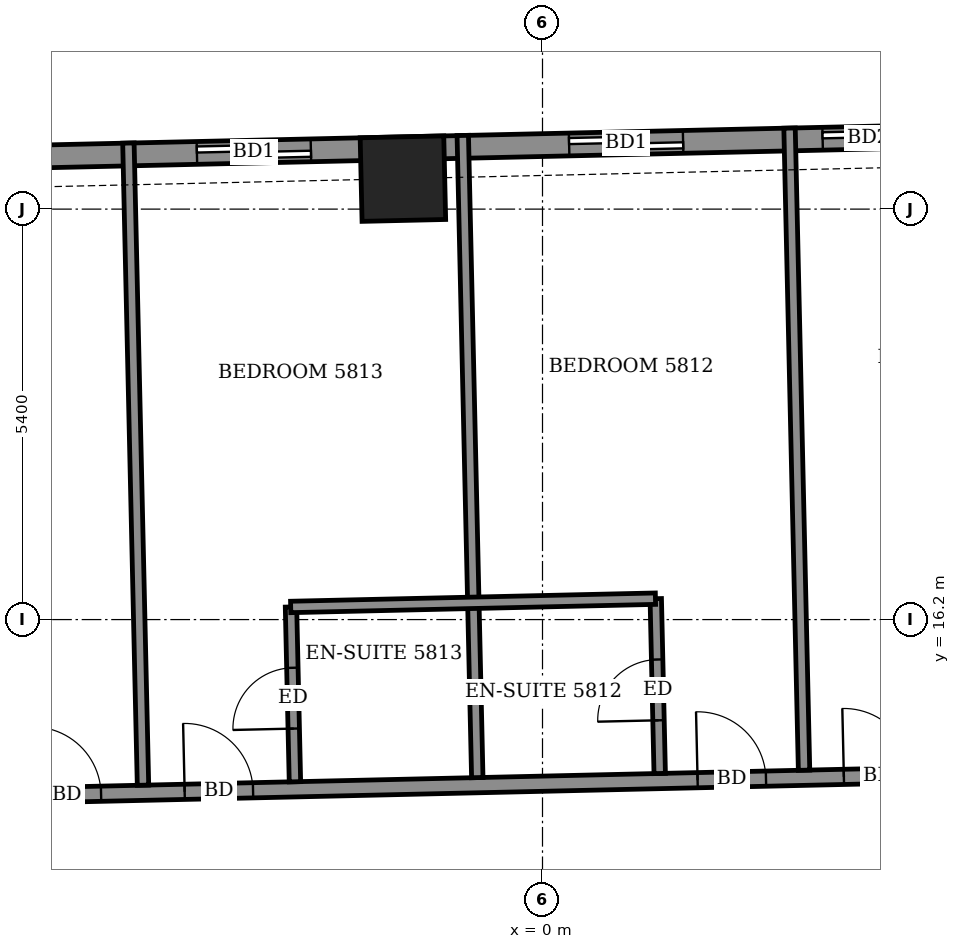
"""IFC4 building model, lengths in metres.
Left out: names, types, materials, properties, quantities, classifications, styles, units other than length and angle.
Written with IfcOpenShell. Run it as: python <this file> out.ifc"""

import sys

from ifc_helpers import new_model, si_unit, direction, frame, frame_2d, origin, origin_2d, place, context, subcontext, project, spatial, rectangle, extrude, element, fill, save


model = new_model("IFC4")
c1 = context("Model", 3, precision=1e-05, world=origin(), true_north=direction((0.0, 1.0)))
c2 = subcontext(c1, "Body", "Model", "MODEL_VIEW")
j1 = project(units=[si_unit("LENGTHUNIT", "METRE"), si_unit("PLANEANGLEUNIT", "RADIAN")], contexts=[c1])
p1 = place(None, origin())
s1 = spatial("IfcSite", under=j1, at=p1, CompositionType="ELEMENT")
p2 = place(p1, origin())
s2 = spatial("IfcBuilding", under=s1, at=p2, CompositionType="ELEMENT")
p3 = place(p2, frame((0.0, 0.0, 231.1)))
s3 = spatial("IfcBuildingStorey", under=s2, at=p3, CompositionType="ELEMENT", Elevation=231.1)
p4 = place(p3, frame((-1.836, 22.001, -0.55), z_axis=(0.0, 0.0, 1.0), x_axis=(-0.999742388325, -0.022697070002, 0.0)))
e1 = element("IfcColumn", 1, at=p4, inside=s3, PredefinedType="COLUMN", context=c2, shape_type="SweptSolid", body=[
    extrude(rectangle(XDim=1.1, YDim=1.1, at=origin_2d()), origin(), (0.0, 0.0, 1.0), 3.6),
])
p5 = place(p3, frame((20.403, 22.905, 0.0), z_axis=(0.0, 0.0, 1.0), x_axis=(-0.99974298964, -0.022670568288, 0.0)))
e2 = element("IfcWall", 2, at=p5, inside=s3, PredefinedType="SOLIDWALL", context=c2, shape_type="SweptSolid", body=[
    extrude(rectangle(XDim=44.509, YDim=0.3, at=frame_2d((22.254, 0.0))), origin(), (0.0, 0.0, 1.0), 2.55),
])
p6 = place(p5, frame((1.62, 0.0, 0.0)))
e3 = element("IfcOpeningElement", 3, at=p6, cuts=e2, PredefinedType="OPENING", context=c2, shape_type="SweptSolid", body=[
    extrude(rectangle(XDim=1.5, YDim=2.4, at=frame_2d((0.75, 1.2))), frame((0.0, 0.16, 0.0), z_axis=(0.0, -1.0, 0.0), x_axis=(1.0, 0.0, 0.0)), (0.0, 0.0, 1.0), 0.32),
])
p7 = place(p5, frame((4.813, 0.0, 0.0)))
e4 = element("IfcOpeningElement", 4, at=p7, cuts=e2, PredefinedType="OPENING", context=c2, shape_type="SweptSolid", body=[
    extrude(rectangle(XDim=1.5, YDim=2.4, at=frame_2d((0.75, 1.2))), frame((0.0, 0.16, 0.0), z_axis=(0.0, -1.0, 0.0), x_axis=(1.0, 0.0, 0.0)), (0.0, 0.0, 1.0), 0.32),
])
p8 = place(p5, frame((9.833, 0.0, 0.0)))
e5 = element("IfcOpeningElement", 5, at=p8, cuts=e2, PredefinedType="OPENING", context=c2, shape_type="SweptSolid", body=[
    extrude(rectangle(XDim=1.5, YDim=2.4, at=frame_2d((0.75, 1.2))), frame((0.0, 0.16, 0.0), z_axis=(0.0, -1.0, 0.0), x_axis=(1.0, 0.0, 0.0)), (0.0, 0.0, 1.0), 0.32),
])
p9 = place(p5, frame((15.522, 0.0, 0.0)))
e6 = element("IfcOpeningElement", 6, at=p9, cuts=e2, PredefinedType="OPENING", context=c2, shape_type="SweptSolid", body=[
    extrude(rectangle(XDim=1.2, YDim=2.4, at=frame_2d((0.6, 1.2))), frame((0.0, 0.16, 0.0), z_axis=(0.0, -1.0, 0.0), x_axis=(1.0, 0.0, 0.0)), (0.0, 0.0, 1.0), 0.32),
])
p10 = place(p5, frame((18.558, 0.0, 0.0)))
e7 = element("IfcOpeningElement", 7, at=p10, cuts=e2, PredefinedType="OPENING", context=c2, shape_type="SweptSolid", body=[
    extrude(rectangle(XDim=1.5, YDim=2.4, at=frame_2d((0.75, 1.2))), frame((0.0, 0.16, 0.0), z_axis=(0.0, -1.0, 0.0), x_axis=(1.0, 0.0, 0.0)), (0.0, 0.0, 1.0), 0.32),
])
p11 = place(p5, frame((23.456, 0.0, 0.0)))
e8 = element("IfcOpeningElement", 8, at=p11, cuts=e2, PredefinedType="OPENING", context=c2, shape_type="SweptSolid", body=[
    extrude(rectangle(XDim=1.5, YDim=2.4, at=frame_2d((0.75, 1.2))), frame((0.0, 0.16, 0.0), z_axis=(0.0, -1.0, 0.0), x_axis=(1.0, 0.0, 0.0)), (0.0, 0.0, 1.0), 0.32),
])
p12 = place(p5, frame((26.89, 0.0, 0.0)))
e9 = element("IfcOpeningElement", 9, at=p12, cuts=e2, PredefinedType="OPENING", context=c2, shape_type="SweptSolid", body=[
    extrude(rectangle(XDim=1.5, YDim=2.4, at=frame_2d((0.75, 1.2))), frame((0.0, 0.16, 0.0), z_axis=(0.0, -1.0, 0.0), x_axis=(1.0, 0.0, 0.0)), (0.0, 0.0, 1.0), 0.32),
])
p13 = place(p5, frame((31.708, 0.0, 0.0)))
e10 = element("IfcOpeningElement", 10, at=p13, cuts=e2, PredefinedType="OPENING", context=c2, shape_type="SweptSolid", body=[
    extrude(rectangle(XDim=1.5, YDim=2.4, at=frame_2d((0.75, 1.2))), frame((0.0, 0.16, 0.0), z_axis=(0.0, -1.0, 0.0), x_axis=(1.0, 0.0, 0.0)), (0.0, 0.0, 1.0), 0.32),
])
p14 = place(p5, frame((35.024, 0.0, 0.0)))
e11 = element("IfcOpeningElement", 11, at=p14, cuts=e2, PredefinedType="OPENING", context=c2, shape_type="SweptSolid", body=[
    extrude(rectangle(XDim=1.5, YDim=2.4, at=frame_2d((0.75, 1.2))), frame((0.0, 0.16, 0.0), z_axis=(0.0, -1.0, 0.0), x_axis=(1.0, 0.0, 0.0)), (0.0, 0.0, 1.0), 0.32),
])
p15 = place(p5, frame((40.173, 0.0, 0.9)))
e12 = element("IfcOpeningElement", 12, at=p15, cuts=e2, PredefinedType="OPENING", context=c2, shape_type="SweptSolid", body=[
    extrude(rectangle(XDim=2.4, YDim=1.5, at=frame_2d((1.2, 0.75))), frame((0.0, 0.16, 0.0), z_axis=(0.0, -1.0, 0.0), x_axis=(1.0, 0.0, 0.0)), (0.0, 0.0, 1.0), 0.32),
])
p16 = place(p3, frame((-27.652, 13.413, 0.0), z_axis=(0.0, 0.0, 1.0), x_axis=(0.999742610679, 0.022687273792, 0.0)))
e13 = element("IfcWall", 13, at=p16, inside=s3, PredefinedType="PARTITIONING", context=c2, shape_type="SweptSolid", body=[
    extrude(rectangle(XDim=50.857, YDim=0.2, at=frame_2d((25.429, 0.0))), origin(), (0.0, 0.0, 1.0), 3.05),
])
p17 = place(p16, frame((49.179, 0.0, 0.0)))
e14 = element("IfcOpeningElement", 14, at=p17, cuts=e13, PredefinedType="OPENING", context=c2, shape_type="SweptSolid", body=[
    extrude(rectangle(XDim=1.0, YDim=2.1, at=frame_2d((0.5, 1.05))), frame((0.0, 0.11, 0.0), z_axis=(0.0, -1.0, 0.0), x_axis=(1.0, 0.0, 0.0)), (0.0, 0.0, 1.0), 0.22),
])
p18 = place(p16, frame((44.9, 0.0, 0.0)))
e15 = element("IfcOpeningElement", 15, at=p18, cuts=e13, PredefinedType="OPENING", context=c2, shape_type="SweptSolid", body=[
    extrude(rectangle(XDim=0.9, YDim=2.1, at=frame_2d((0.45, 1.05))), frame((0.0, 0.11, 0.0), z_axis=(0.0, -1.0, 0.0), x_axis=(1.0, 0.0, 0.0)), (0.0, 0.0, 1.0), 0.22),
])
p19 = place(p16, frame((40.375, 0.0, 0.0)))
e16 = element("IfcOpeningElement", 16, at=p19, cuts=e13, PredefinedType="OPENING", context=c2, shape_type="SweptSolid", body=[
    extrude(rectangle(XDim=0.9, YDim=2.1, at=frame_2d((0.45, 1.05))), frame((0.0, 0.11, 0.0), z_axis=(0.0, -1.0, 0.0), x_axis=(1.0, 0.0, 0.0)), (0.0, 0.0, 1.0), 0.22),
])
p20 = place(p16, frame((38.425, 0.0, 0.0)))
e17 = element("IfcOpeningElement", 17, at=p20, cuts=e13, PredefinedType="OPENING", context=c2, shape_type="SweptSolid", body=[
    extrude(rectangle(XDim=0.9, YDim=2.1, at=frame_2d((0.45, 1.05))), frame((0.0, 0.11, 0.0), z_axis=(0.0, -1.0, 0.0), x_axis=(1.0, 0.0, 0.0)), (0.0, 0.0, 1.0), 0.22),
])
p21 = place(p16, frame((31.625, 0.0, 0.0)))
e18 = element("IfcOpeningElement", 18, at=p21, cuts=e13, PredefinedType="OPENING", context=c2, shape_type="SweptSolid", body=[
    extrude(rectangle(XDim=0.9, YDim=2.1, at=frame_2d((0.45, 1.05))), frame((0.0, 0.11, 0.0), z_axis=(0.0, -1.0, 0.0), x_axis=(1.0, 0.0, 0.0)), (0.0, 0.0, 1.0), 0.22),
])
p22 = place(p16, frame((29.7, 0.0, 0.0)))
e19 = element("IfcOpeningElement", 19, at=p22, cuts=e13, PredefinedType="OPENING", context=c2, shape_type="SweptSolid", body=[
    extrude(rectangle(XDim=0.9, YDim=2.1, at=frame_2d((0.45, 1.05))), frame((0.0, 0.11, 0.0), z_axis=(0.0, -1.0, 0.0), x_axis=(1.0, 0.0, 0.0)), (0.0, 0.0, 1.0), 0.22),
])
p23 = place(p16, frame((22.95, 0.0, 0.0)))
e20 = element("IfcOpeningElement", 20, at=p23, cuts=e13, PredefinedType="OPENING", context=c2, shape_type="SweptSolid", body=[
    extrude(rectangle(XDim=0.9, YDim=2.1, at=frame_2d((0.45, 1.05))), frame((0.0, 0.11, 0.0), z_axis=(0.0, -1.0, 0.0), x_axis=(1.0, 0.0, 0.0)), (0.0, 0.0, 1.0), 0.22),
])
p24 = place(p16, frame((20.95, 0.0, 0.0)))
e21 = element("IfcOpeningElement", 21, at=p24, cuts=e13, PredefinedType="OPENING", context=c2, shape_type="SweptSolid", body=[
    extrude(rectangle(XDim=0.9, YDim=2.1, at=frame_2d((0.45, 1.05))), frame((0.0, 0.11, 0.0), z_axis=(0.0, -1.0, 0.0), x_axis=(1.0, 0.0, 0.0)), (0.0, 0.0, 1.0), 0.22),
])
p25 = place(p16, frame((14.15, 0.0, 0.0)))
e22 = element("IfcOpeningElement", 22, at=p25, cuts=e13, PredefinedType="OPENING", context=c2, shape_type="SweptSolid", body=[
    extrude(rectangle(XDim=0.9, YDim=2.1, at=frame_2d((0.45, 1.05))), frame((0.0, 0.11, 0.0), z_axis=(0.0, -1.0, 0.0), x_axis=(1.0, 0.0, 0.0)), (0.0, 0.0, 1.0), 0.22),
])
p26 = place(p16, frame((12.2, 0.0, 0.0)))
e23 = element("IfcOpeningElement", 23, at=p26, cuts=e13, PredefinedType="OPENING", context=c2, shape_type="SweptSolid", body=[
    extrude(rectangle(XDim=0.9, YDim=2.1, at=frame_2d((0.45, 1.05))), frame((0.0, 0.11, 0.0), z_axis=(0.0, -1.0, 0.0), x_axis=(1.0, 0.0, 0.0)), (0.0, 0.0, 1.0), 0.22),
])
p27 = place(p16, frame((2.05, 0.0, 0.0)))
e24 = element("IfcOpeningElement", 24, at=p27, cuts=e13, PredefinedType="OPENING", context=c2, shape_type="SweptSolid", body=[
    extrude(rectangle(XDim=1.0, YDim=2.1, at=frame_2d((0.5, 1.05))), frame((0.0, 0.11, 0.0), z_axis=(0.0, -1.0, 0.0), x_axis=(1.0, 0.0, 0.0)), (0.0, 0.0, 1.0), 0.22),
])
p28 = place(p16, frame((7.45, 0.0, 0.0)))
e25 = element("IfcOpeningElement", 25, at=p28, cuts=e13, PredefinedType="OPENING", context=c2, shape_type="SweptSolid", body=[
    extrude(rectangle(XDim=0.9, YDim=2.1, at=frame_2d((0.45, 1.05))), frame((0.0, 0.11, 0.0), z_axis=(0.0, -1.0, 0.0), x_axis=(1.0, 0.0, 0.0)), (0.0, 0.0, 1.0), 0.22),
])
p29 = place(p3, frame((-5.256, 14.021, 0.0), z_axis=(0.0, 0.0, 1.0), x_axis=(-0.022708935798, 0.999742118866, 0.0)))
e26 = element("IfcWall", 26, at=p29, inside=s3, PredefinedType="PARTITIONING", context=c2, shape_type="SweptSolid", body=[
    extrude(rectangle(XDim=8.45, YDim=0.15, at=frame_2d((4.225, 0.0))), origin(), (0.0, 0.0, 1.0), 2.5),
])
p30 = place(p3, frame((-3.257, 14.066, 0.0), z_axis=(0.0, 0.0, 1.0), x_axis=(-0.022603288534, 0.999744513037, 0.0)))
e27 = element("IfcWall", 27, at=p30, inside=s3, PredefinedType="PARTITIONING", context=c2, shape_type="SweptSolid", body=[
    extrude(rectangle(XDim=2.301, YDim=0.15, at=frame_2d((1.15, 0.0))), origin(), (0.0, 0.0, 1.0), 3.05),
])
p31 = place(p30, frame((0.7, 0.0, 0.0)))
e28 = element("IfcOpeningElement", 28, at=p31, cuts=e27, PredefinedType="OPENING", context=c2, shape_type="SweptSolid", body=[
    extrude(rectangle(XDim=0.8, YDim=2.1, at=frame_2d((0.4, 1.05))), frame((0.0, 0.085, 0.0), z_axis=(0.0, -1.0, 0.0), x_axis=(1.0, 0.0, 0.0)), (0.0, 0.0, 1.0), 0.17),
])
p32 = place(p3, frame((-0.858, 14.121, 0.0), z_axis=(0.0, 0.0, 1.0), x_axis=(-0.022622304913, 0.999744082913, 0.0)))
e29 = element("IfcWall", 29, at=p32, inside=s3, PredefinedType="PARTITIONING", context=c2, shape_type="SweptSolid", body=[
    extrude(rectangle(XDim=8.45, YDim=0.15, at=frame_2d((4.225, 0.0))), origin(), (0.0, 0.0, 1.0), 2.5),
])
p33 = place(p3, frame((1.542, 14.175, 0.0), z_axis=(0.0, 0.0, 1.0), x_axis=(-0.022603288534, 0.999744513037, 0.0)))
e30 = element("IfcWall", 30, at=p33, inside=s3, PredefinedType="PARTITIONING", context=c2, shape_type="SweptSolid", body=[
    extrude(rectangle(XDim=2.301, YDim=0.15, at=frame_2d((1.15, 0.0))), origin(), (0.0, 0.0, 1.0), 3.05),
])
p34 = place(p33, frame((0.7, 0.0, 0.0)))
e31 = element("IfcOpeningElement", 31, at=p34, cuts=e30, PredefinedType="OPENING", context=c2, shape_type="SweptSolid", body=[
    extrude(rectangle(XDim=0.8, YDim=2.1, at=frame_2d((0.4, 1.05))), frame((0.0, 0.085, 0.0), z_axis=(0.0, -1.0, 0.0), x_axis=(1.0, 0.0, 0.0)), (0.0, 0.0, 1.0), 0.17),
])
p35 = place(p3, frame((3.441, 14.218, 0.0), z_axis=(0.0, 0.0, 1.0), x_axis=(-0.022593427839, 0.999744735929, 0.0)))
e32 = element("IfcWall", 32, at=p35, inside=s3, PredefinedType="PARTITIONING", context=c2, shape_type="SweptSolid", body=[
    extrude(rectangle(XDim=8.45, YDim=0.15, at=frame_2d((4.225, 0.0))), origin(), (0.0, 0.0, 1.0), 2.5),
])
p36 = place(p3, frame((-3.313, 16.366, 0.0), z_axis=(0.0, 0.0, 1.0), x_axis=(0.99974154664, 0.022734113616, 0.0)))
e33 = element("IfcWall", 33, at=p36, inside=s3, PredefinedType="PARTITIONING", context=c2, shape_type="SweptSolid", body=[
    extrude(rectangle(XDim=4.8, YDim=0.15, at=frame_2d((2.4, 0.0))), origin(), (0.0, 0.0, 1.0), 3.05),
])
p37 = place(p9, origin())
e34 = element("IfcDoor", 34, at=p37, inside=s3, OperationType="SLIDING_TO_LEFT", PredefinedType="DOOR", context=c2, shape_type="SweptSolid", body=[
    extrude(rectangle(XDim=1.2, YDim=2.4, at=frame_2d((0.6, 1.2))), frame((0.0, 0.025, 0.0), z_axis=(0.0, -1.0, 0.0), x_axis=(1.0, 0.0, 0.0)), (0.0, 0.0, 1.0), 0.05),
])
fill(e6, e34)
p38 = place(p10, origin())
e35 = element("IfcDoor", 35, at=p38, inside=s3, OperationType="SLIDING_TO_LEFT", PredefinedType="DOOR", context=c2, shape_type="SweptSolid", body=[
    extrude(rectangle(XDim=1.5, YDim=2.4, at=frame_2d((0.75, 1.2))), frame((0.0, 0.025, 0.0), z_axis=(0.0, -1.0, 0.0), x_axis=(1.0, 0.0, 0.0)), (0.0, 0.0, 1.0), 0.05),
])
fill(e7, e35)
p39 = place(p11, origin())
e36 = element("IfcDoor", 36, at=p39, inside=s3, OperationType="SLIDING_TO_LEFT", PredefinedType="DOOR", context=c2, shape_type="SweptSolid", body=[
    extrude(rectangle(XDim=1.5, YDim=2.4, at=frame_2d((0.75, 1.2))), frame((0.0, 0.025, 0.0), z_axis=(0.0, -1.0, 0.0), x_axis=(1.0, 0.0, 0.0)), (0.0, 0.0, 1.0), 0.05),
])
fill(e8, e36)
p40 = place(p21, origin())
e37 = element("IfcDoor", 37, at=p40, inside=s3, OperationType="SINGLE_SWING_LEFT", PredefinedType="DOOR", context=c2, shape_type="SweptSolid", body=[
    extrude(rectangle(XDim=0.9, YDim=2.1, at=frame_2d((0.45, 1.05))), frame((0.0, 0.025, 0.0), z_axis=(0.0, -1.0, 0.0), x_axis=(1.0, 0.0, 0.0)), (0.0, 0.0, 1.0), 0.05),
])
fill(e18, e37)
p41 = place(p22, origin())
e38 = element("IfcDoor", 38, at=p41, inside=s3, OperationType="SINGLE_SWING_RIGHT", PredefinedType="DOOR", context=c2, shape_type="SweptSolid", body=[
    extrude(rectangle(XDim=0.9, YDim=2.1, at=frame_2d((0.45, 1.05))), frame((0.0, 0.025, 0.0), z_axis=(0.0, -1.0, 0.0), x_axis=(1.0, 0.0, 0.0)), (0.0, 0.0, 1.0), 0.05),
])
fill(e19, e38)
p42 = place(p34, origin())
e39 = element("IfcDoor", 39, at=p42, inside=s3, OperationType="SINGLE_SWING_RIGHT", PredefinedType="DOOR", context=c2, shape_type="SweptSolid", body=[
    extrude(rectangle(XDim=0.8, YDim=2.1, at=frame_2d((0.4, 1.05))), frame((0.0, 0.025, 0.0), z_axis=(0.0, -1.0, 0.0), x_axis=(1.0, 0.0, 0.0)), (0.0, 0.0, 1.0), 0.05),
])
fill(e31, e39)
p43 = place(p23, origin())
e40 = element("IfcDoor", 40, at=p43, inside=s3, OperationType="SINGLE_SWING_LEFT", PredefinedType="DOOR", context=c2, shape_type="SweptSolid", body=[
    extrude(rectangle(XDim=0.9, YDim=2.1, at=frame_2d((0.45, 1.05))), frame((0.0, 0.025, 0.0), z_axis=(0.0, -1.0, 0.0), x_axis=(1.0, 0.0, 0.0)), (0.0, 0.0, 1.0), 0.05),
])
fill(e20, e40)
p44 = place(p31, origin())
e41 = element("IfcDoor", 41, at=p44, inside=s3, OperationType="SINGLE_SWING_LEFT", PredefinedType="DOOR", context=c2, shape_type="SweptSolid", body=[
    extrude(rectangle(XDim=0.8, YDim=2.1, at=frame_2d((0.4, 1.05))), frame((0.0, 0.025, 0.0), z_axis=(0.0, -1.0, 0.0), x_axis=(1.0, 0.0, 0.0)), (0.0, 0.0, 1.0), 0.05),
])
fill(e28, e41)
p45 = place(p24, origin())
e42 = element("IfcDoor", 42, at=p45, inside=s3, OperationType="SINGLE_SWING_RIGHT", PredefinedType="DOOR", context=c2, shape_type="SweptSolid", body=[
    extrude(rectangle(XDim=0.9, YDim=2.1, at=frame_2d((0.45, 1.05))), frame((0.0, 0.025, 0.0), z_axis=(0.0, -1.0, 0.0), x_axis=(1.0, 0.0, 0.0)), (0.0, 0.0, 1.0), 0.05),
])
fill(e21, e42)
save(model, sys.argv[1])
